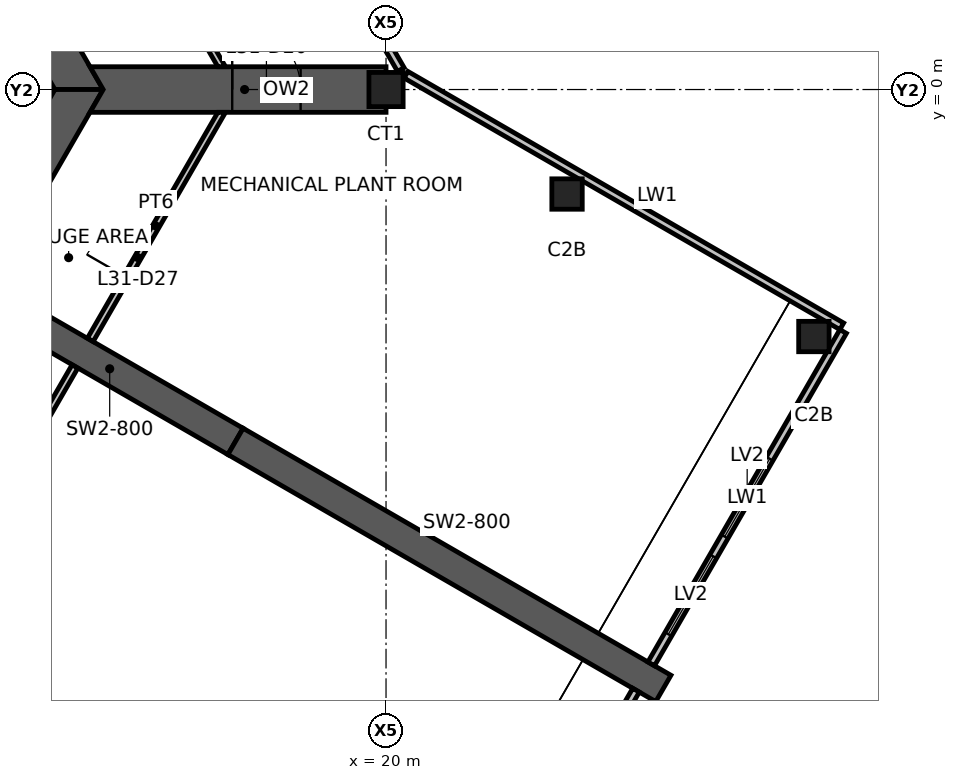
"""IFC4 building model, lengths in metres.
Left out: names, types, materials, properties, quantities, classifications, styles, units other than length and angle.
Written with IfcOpenShell. Run it as: python <this file> out.ifc"""

import sys

from ifc_helpers import new_model, si_unit, direction, frame, frame_2d, origin, origin_2d, place, context, subcontext, project, spatial, polyline, rectangle, hollow_rectangle, outline, extrude, element, fill, save


model = new_model("IFC4")
c1 = context("Model", 3, precision=1e-05, world=origin(), true_north=direction((0.0, 1.0)))
c2 = subcontext(c1, "Body", "Model", "MODEL_VIEW")
j1 = project(units=[si_unit("LENGTHUNIT", "METRE"), si_unit("PLANEANGLEUNIT", "RADIAN")], contexts=[c1])
p1 = place(None, origin())
s1 = spatial("IfcSite", under=j1, at=p1, CompositionType="ELEMENT")
p2 = place(p1, origin())
s2 = spatial("IfcBuilding", under=s1, at=p2, CompositionType="ELEMENT")
p3 = place(p2, frame((0.0, 0.0, 123.6)))
s3 = spatial("IfcBuildingStorey", under=s2, at=p3, CompositionType="ELEMENT", Elevation=123.6)
p4 = place(p3, frame((20.0, 0.0, 0.0), z_axis=(0.0, 0.0, 1.0), x_axis=(1.0, 0.0, 0.0)))
e1 = element("IfcColumn", 1, at=p4, inside=s3, PredefinedType="COLUMN", context=c2, shape_type="SweptSolid", body=[
    extrude(hollow_rectangle(XDim=0.9, YDim=0.9, WallThickness=0.07, at=origin_2d()), origin(), (0.0, 0.0, 1.0), 5.0),
])
for number, where, z_axis, x_axis in (
    (2, (24.763, -2.75, 0.0), (0.0, 0.0, 1.0), (1.0, 0.0, 0.0)),
    (3, (31.258, -6.5, 0.0), (0.0, 0.0, 1.0), (1.0, 0.0, 0.0)),
):
    element("IfcColumn", number, at=place(p3, frame(where, z_axis=z_axis, x_axis=x_axis)), inside=s3, PredefinedType="COLUMN", context=c2, shape_type="SweptSolid", body=[
        extrude(hollow_rectangle(XDim=0.8, YDim=0.8, WallThickness=0.045, at=origin_2d()), origin(), (0.0, 0.0, 1.0), 5.0),
    ])
p5 = place(p3, frame((11.922, 0.0, 0.0), z_axis=(0.0, 0.0, 1.0), x_axis=(-0.500004296715, 0.866022923061, 0.0)))
e4 = element("IfcWall", 4, at=p5, inside=s3, PredefinedType="SHEAR", context=c2, shape_type="SweptSolid", body=[
    extrude(outline(polyline([(-0.318, -0.55), (5.835, -0.55), (6.635, -0.55), (12.24, -0.55), (11.605, 0.55), (6.635, 0.55), (5.835, 0.55), (0.318, 0.55), (-0.318, -0.55)])), origin(), (0.0, 0.0, 1.0), 5.0),
])
p6 = place(p5, frame((5.835, 0.0, 0.0)))
e5 = element("IfcOpeningElement", 5, at=p6, cuts=e4, PredefinedType="OPENING", context=c2, shape_type="SweptSolid", body=[
    extrude(rectangle(XDim=0.8, YDim=2.1, at=frame_2d((0.4, 1.05))), frame((0.0, 0.56, 0.0), z_axis=(0.0, -1.0, 0.0), x_axis=(1.0, 0.0, 0.0)), (0.0, 0.0, 1.0), 1.12),
])
p7 = place(p3, frame((5.961, -10.325, 0.0), z_axis=(0.0, 0.0, 1.0), x_axis=(0.500004296715, 0.866022923061, 0.0)))
e6 = element("IfcWall", 6, at=p7, inside=s3, PredefinedType="SHEAR", context=c2, shape_type="SweptSolid", body=[
    extrude(outline(polyline([(-0.318, -0.55), (4.594, -0.55), (5.394, -0.55), (12.24, -0.55), (11.605, 0.55), (5.394, 0.55), (4.594, 0.55), (0.318, 0.55), (-0.318, -0.55)])), origin(), (0.0, 0.0, 1.0), 5.0),
])
p8 = place(p7, frame((4.594, 0.0, 0.0)))
e7 = element("IfcOpeningElement", 7, at=p8, cuts=e6, PredefinedType="OPENING", context=c2, shape_type="SweptSolid", body=[
    extrude(rectangle(XDim=0.8, YDim=2.1, at=frame_2d((0.4, 1.05))), frame((0.0, 0.56, 0.0), z_axis=(0.0, -1.0, 0.0), x_axis=(1.0, 0.0, 0.0)), (0.0, 0.0, 1.0), 1.12),
])
p9 = place(p3, frame((9.418, -5.438, 0.0), z_axis=(0.0, 0.0, 1.0), x_axis=(0.866029782078, -0.499992416496, 0.0)))
e8 = element("IfcWall", 8, at=p9, inside=s3, PredefinedType="SHEAR", context=c2, shape_type="SweptSolid", body=[
    extrude(rectangle(XDim=7.646, YDim=0.8, at=frame_2d((3.823, 0.0))), origin(), (0.0, 0.0, 1.0), 5.0),
])
p10 = place(p9, frame((0.85, 0.0, 0.0)))
e9 = element("IfcOpeningElement", 9, at=p10, cuts=e8, PredefinedType="OPENING", context=c2, shape_type="SweptSolid", body=[
    extrude(rectangle(XDim=1.0, YDim=2.1, at=frame_2d((0.5, 1.05))), frame((0.0, 0.41, 0.0), z_axis=(0.0, -1.0, 0.0), x_axis=(1.0, 0.0, 0.0)), (0.0, 0.0, 1.0), 0.82),
])
p11 = place(p3, frame((16.039, -9.26, 0.0), z_axis=(0.0, 0.0, 1.0), x_axis=(0.866024837091, -0.50000098154, 0.0)))
e10 = element("IfcWall", 10, at=p11, inside=s3, PredefinedType="SHEAR", context=c2, shape_type="SweptSolid", body=[
    extrude(rectangle(XDim=13.0, YDim=0.8, at=frame_2d((6.5, 0.0))), origin(), (0.0, 0.0, 1.0), 5.0),
])
p12 = place(p3, frame((12.557, 0.0, -1.15), z_axis=(0.0, 0.0, 1.0), x_axis=(1.0, 0.0, 0.0)))
e11 = element("IfcWall", 11, at=p12, inside=s3, PredefinedType="SHEAR", context=c2, shape_type="SweptSolid", body=[
    extrude(outline(polyline([(-0.346, -0.6), (3.395, -0.6), (5.195, -0.6), (7.443, -0.6), (7.443, 0.6), (5.195, 0.6), (3.395, 0.6), (-0.346, 0.6), (0.0, 0.0), (-0.346, -0.6)])), origin(), (0.0, 0.0, 1.0), 6.15),
])
p13 = place(p12, frame((3.395, 0.0, 1.15)))
e12 = element("IfcOpeningElement", 12, at=p13, cuts=e11, PredefinedType="OPENING", context=c2, shape_type="SweptSolid", body=[
    extrude(rectangle(XDim=1.8, YDim=2.4, at=frame_2d((0.9, 1.2))), frame((0.0, 0.61, 0.0), z_axis=(0.0, -1.0, 0.0), x_axis=(1.0, 0.0, 0.0)), (0.0, 0.0, 1.0), 1.22),
])
p14 = place(p3, frame((21.528, -24.553, 0.0), z_axis=(0.0, 0.0, 1.0), x_axis=(0.500004929441, 0.866022557752, 0.0)))
e13 = element("IfcWall", 13, at=p14, inside=s3, PredefinedType="ELEMENTEDWALL", context=c2, shape_type="SweptSolid", body=[
    extrude(rectangle(XDim=10.1, YDim=0.2, at=frame_2d((5.05, 0.0))), origin(), (0.0, 0.0, 1.0), 5.0),
])
p15 = place(p14, frame((3.867, 0.0, 0.6)))
e14 = element("IfcOpeningElement", 14, at=p15, cuts=e13, PredefinedType="OPENING", context=c2, shape_type="SweptSolid", body=[
    extrude(rectangle(XDim=2.367, YDim=3.6, at=frame_2d((1.183, 1.8))), frame((0.0, 0.11, 0.0), z_axis=(0.0, -1.0, 0.0), x_axis=(1.0, 0.0, 0.0)), (0.0, 0.0, 1.0), 0.22),
])
p16 = place(p14, frame((6.833, 0.0, 0.6)))
e15 = element("IfcOpeningElement", 15, at=p16, cuts=e13, PredefinedType="OPENING", context=c2, shape_type="SweptSolid", body=[
    extrude(rectangle(XDim=2.367, YDim=3.6, at=frame_2d((1.183, 1.8))), frame((0.0, 0.11, 0.0), z_axis=(0.0, -1.0, 0.0), x_axis=(1.0, 0.0, 0.0)), (0.0, 0.0, 1.0), 0.22),
])
p17 = place(p3, frame((26.978, -15.114, 0.0), z_axis=(0.0, 0.0, 1.0), x_axis=(0.499986799974, 0.866033024689, 0.0)))
e16 = element("IfcWall", 16, at=p17, inside=s3, PredefinedType="ELEMENTEDWALL", context=c2, shape_type="SweptSolid", body=[
    extrude(rectangle(XDim=10.1, YDim=0.2, at=frame_2d((5.05, 0.0))), origin(), (0.0, 0.0, 1.0), 5.0),
])
p18 = place(p17, frame((0.9, 0.0, 0.6)))
e17 = element("IfcOpeningElement", 17, at=p18, cuts=e16, PredefinedType="OPENING", context=c2, shape_type="SweptSolid", body=[
    extrude(rectangle(XDim=2.367, YDim=3.6, at=frame_2d((1.183, 1.8))), frame((0.0, 0.11, 0.0), z_axis=(0.0, -1.0, 0.0), x_axis=(1.0, 0.0, 0.0)), (0.0, 0.0, 1.0), 0.22),
])
p19 = place(p17, frame((3.867, 0.0, 0.6)))
e18 = element("IfcOpeningElement", 18, at=p19, cuts=e16, PredefinedType="OPENING", context=c2, shape_type="SweptSolid", body=[
    extrude(rectangle(XDim=2.367, YDim=3.6, at=frame_2d((1.183, 1.8))), frame((0.0, 0.11, 0.0), z_axis=(0.0, -1.0, 0.0), x_axis=(1.0, 0.0, 0.0)), (0.0, 0.0, 1.0), 0.22),
])
p20 = place(p3, frame((31.991, -6.23, 0.0), z_axis=(0.0, 0.0, 1.0), x_axis=(-0.86602620781, 0.499998607384, 0.0)))
e19 = element("IfcWall", 19, at=p20, inside=s3, PredefinedType="ELEMENTEDWALL", context=c2, shape_type="SweptSolid", body=[
    extrude(rectangle(XDim=13.239, YDim=0.2, at=frame_2d((6.62, 0.0))), origin(), (0.0, 0.0, 1.0), 5.0),
])
p21 = place(p3, frame((20.389, 0.526, 0.0), z_axis=(0.0, 0.0, 1.0), x_axis=(-0.499999841607, 0.866025495233, 0.0)))
e20 = element("IfcWall", 20, at=p21, inside=s3, PredefinedType="ELEMENTEDWALL", context=c2, shape_type="SweptSolid", body=[
    extrude(rectangle(XDim=19.479, YDim=0.2, at=frame_2d((9.739, 0.0))), origin(), (0.0, 0.0, 1.0), 5.0),
])
p22 = place(p3, frame((15.675, 0.6, 0.0), z_axis=(0.0, 0.0, 1.0), x_axis=(-0.500003545903, 0.866023356546, 0.0)))
e21 = element("IfcWall", 21, at=p22, inside=s3, PredefinedType="PARTITIONING", context=c2, shape_type="SweptSolid", body=[
    extrude(outline(polyline([(-0.051, -0.087), (1.213, -0.087), (2.413, -0.087), (14.686, -0.087), (14.585, 0.087), (2.413, 0.087), (1.213, 0.087), (0.051, 0.087), (-0.051, -0.087)])), origin(), (0.0, 0.0, 1.0), 4.8),
])
p23 = place(p22, frame((1.213, 0.0, 0.0)))
e22 = element("IfcOpeningElement", 22, at=p23, cuts=e21, PredefinedType="OPENING", context=c2, shape_type="SweptSolid", body=[
    extrude(rectangle(XDim=1.2, YDim=2.1, at=frame_2d((0.6, 1.05))), frame((0.0, 0.098, 0.0), z_axis=(0.0, -1.0, 0.0), x_axis=(1.0, 0.0, 0.0)), (0.0, 0.0, 1.0), 0.195),
])
p24 = place(p3, frame((12.219, -6.587, 0.0), z_axis=(0.0, 0.0, 1.0), x_axis=(0.500005739714, 0.866022089933, 0.0)))
e23 = element("IfcWall", 23, at=p24, inside=s3, PredefinedType="PARTITIONING", context=c2, shape_type="SweptSolid", body=[
    extrude(outline(polyline([(0.0, -0.087), (1.9, -0.087), (3.1, -0.087), (6.964, -0.087), (6.863, 0.087), (3.1, 0.087), (1.9, 0.087), (0.0, 0.087), (0.0, -0.087)])), origin(), (0.0, 0.0, 1.0), 4.8),
])
p25 = place(p24, frame((1.9, 0.0, 0.0)))
e24 = element("IfcOpeningElement", 24, at=p25, cuts=e23, PredefinedType="OPENING", context=c2, shape_type="SweptSolid", body=[
    extrude(rectangle(XDim=1.2, YDim=2.1, at=frame_2d((0.6, 1.05))), frame((0.0, 0.098, 0.0), z_axis=(0.0, -1.0, 0.0), x_axis=(1.0, 0.0, 0.0)), (0.0, 0.0, 1.0), 0.195),
])
p26 = place(p3, frame((8.357, -13.275, 0.0), z_axis=(0.0, 0.0, 1.0), x_axis=(0.500005739714, 0.866022089933, 0.0)))
e25 = element("IfcWall", 25, at=p26, inside=s3, PredefinedType="PARTITIONING", context=c2, shape_type="SweptSolid", body=[
    extrude(outline(polyline([(-0.051, -0.087), (6.913, -0.087), (6.913, 0.087), (0.051, 0.087), (-0.051, -0.087)])), origin(), (0.0, 0.0, 1.0), 4.8),
])
p27 = place(p18, origin())
e26 = element("IfcWindow", 26, at=p27, inside=s3, PartitioningType="SINGLE_PANEL", PredefinedType="USERDEFINED", context=c2, shape_type="SweptSolid", body=[
    extrude(rectangle(XDim=2.367, YDim=3.6, at=frame_2d((1.183, 1.8))), frame((0.0, 0.03, 0.0), z_axis=(0.0, -1.0, 0.0), x_axis=(1.0, 0.0, 0.0)), (0.0, 0.0, 1.0), 0.06),
])
fill(e17, e26)
p28 = place(p19, origin())
e27 = element("IfcWindow", 27, at=p28, inside=s3, PartitioningType="SINGLE_PANEL", PredefinedType="USERDEFINED", context=c2, shape_type="SweptSolid", body=[
    extrude(rectangle(XDim=2.367, YDim=3.6, at=frame_2d((1.183, 1.8))), frame((0.0, 0.03, 0.0), z_axis=(0.0, -1.0, 0.0), x_axis=(1.0, 0.0, 0.0)), (0.0, 0.0, 1.0), 0.06),
])
fill(e18, e27)
p29 = place(p13, origin())
e28 = element("IfcDoor", 28, at=p29, inside=s3, OperationType="DOUBLE_DOOR_SINGLE_SWING", PredefinedType="DOOR", context=c2, shape_type="SweptSolid", body=[
    extrude(rectangle(XDim=1.8, YDim=2.4, at=frame_2d((0.9, 1.2))), frame((0.0, 0.025, 0.0), z_axis=(0.0, -1.0, 0.0), x_axis=(1.0, 0.0, 0.0)), (0.0, 0.0, 1.0), 0.05),
])
fill(e12, e28)
p30 = place(p25, origin())
e29 = element("IfcDoor", 29, at=p30, inside=s3, OperationType="DOUBLE_DOOR_SINGLE_SWING", PredefinedType="DOOR", context=c2, shape_type="SweptSolid", body=[
    extrude(rectangle(XDim=1.2, YDim=2.1, at=frame_2d((0.6, 1.05))), frame((0.0, 0.025, 0.0), z_axis=(0.0, -1.0, 0.0), x_axis=(1.0, 0.0, 0.0)), (0.0, 0.0, 1.0), 0.05),
])
fill(e24, e29)
save(model, sys.argv[1])
